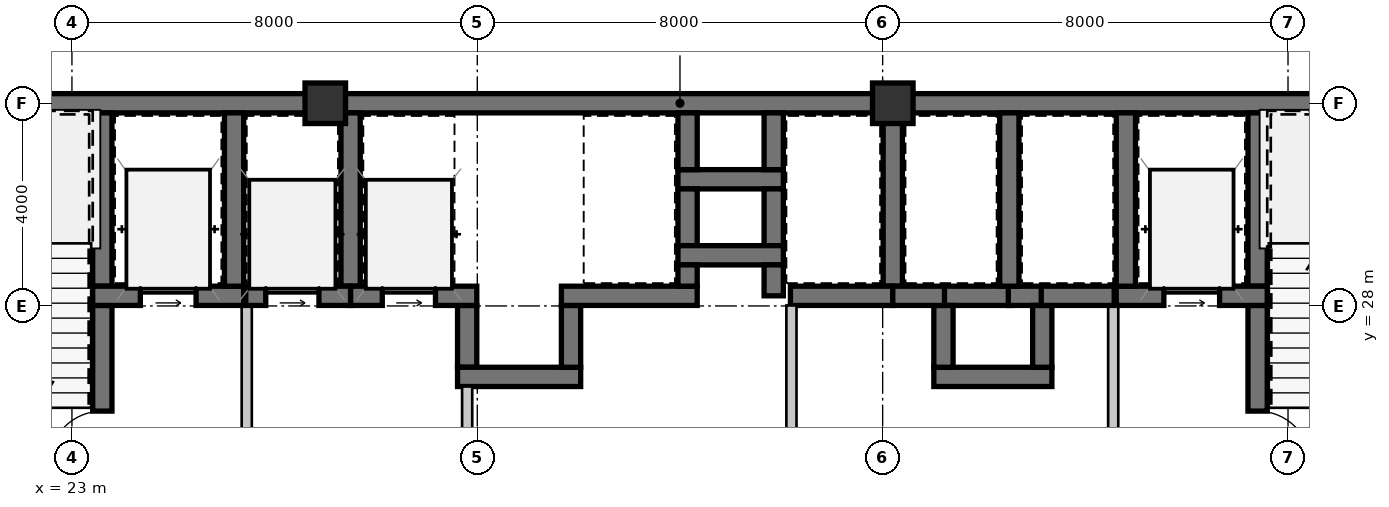
"""IFC4 building model, lengths in metres.
Left out: names, types, materials, properties, quantities, classifications, styles, units other than length and angle.
Written with IfcOpenShell. Run it as: python <this file> out.ifc"""

import sys

from ifc_helpers import new_model, si_unit, direction, frame, frame_2d, origin, origin_2d, place, context, subcontext, project, spatial, rectangle, extrude, source, transform, mapped, element, fill, save


model = new_model("IFC4")
c1 = context("Model", 3, precision=1e-05, world=origin(), true_north=direction((0.0, 1.0)))
c2 = subcontext(c1, "Body", "Model", "MODEL_VIEW")
j1 = project(units=[si_unit("LENGTHUNIT", "METRE"), si_unit("PLANEANGLEUNIT", "RADIAN")], contexts=[c1])
p1 = place(None, origin())
s1 = spatial("IfcSite", under=j1, at=p1, CompositionType="ELEMENT")
p2 = place(p1, origin())
s2 = spatial("IfcBuilding", under=s1, at=p2, CompositionType="ELEMENT")
p3 = place(p2, frame((0.0, 0.0, 51.45)))
s3 = spatial("IfcBuildingStorey", under=s2, at=p3, CompositionType="ELEMENT", Elevation=51.45)
m1 = source(origin(), c2, "Body", "SweptSolid", [
    extrude(rectangle(XDim=0.8, YDim=0.8, at=origin_2d()), origin(), (0.0, 0.0, 1.0), 3.15),
])
for number, where, z_axis, x_axis in (
    (1, (28.0, 32.0, 0.0), (0.0, 0.0, 1.0), (1.0, 0.0, 0.0)),
    (2, (39.2, 32.0, 0.0), (0.0, 0.0, 1.0), (1.0, 0.0, 0.0)),
):
    element("IfcColumn", number, at=place(p3, frame(where, z_axis=z_axis, x_axis=x_axis)), inside=s3, PredefinedType="COLUMN", context=c2, shape_type="MappedRepresentation", body=[
        mapped(m1, transform((0.0, 0.0, 0.0), scale=1.0)),
    ])
m2 = source(origin(), c2, "Body", "SweptSolid", [
    extrude(rectangle(XDim=9.19, YDim=0.38, at=frame_2d((4.595, 0.0))), origin(), (0.0, 0.0, 1.0), 2.93),
])
p4 = place(p3, frame((18.81, 32.0, 0.0), z_axis=(0.0, 0.0, 1.0), x_axis=(1.0, 0.0, 0.0)))
e3 = element("IfcWall", 3, at=p4, inside=s3, PredefinedType="SHEAR", context=c2, shape_type="MappedRepresentation", body=[
    mapped(m2, transform((0.0, 0.0, 0.0), scale=1.0)),
])
m3 = source(origin(), c2, "Body", "SweptSolid", [
    extrude(rectangle(XDim=11.2, YDim=0.38, at=frame_2d((5.6, 0.0))), origin(), (0.0, 0.0, 1.0), 2.93),
])
p5 = place(p3, frame((28.0, 32.0, 0.0), z_axis=(0.0, 0.0, 1.0), x_axis=(1.0, 0.0, 0.0)))
e4 = element("IfcWall", 4, at=p5, inside=s3, PredefinedType="SHEAR", context=c2, shape_type="MappedRepresentation", body=[
    mapped(m3, transform((0.0, 0.0, 0.0), scale=1.0)),
])
m4 = source(origin(), c2, "Body", "SweptSolid", [
    extrude(rectangle(XDim=11.99, YDim=0.38, at=frame_2d((5.995, 0.0))), origin(), (0.0, 0.0, 1.0), 2.93),
])
p6 = place(p3, frame((39.2, 32.0, 0.0), z_axis=(0.0, 0.0, 1.0), x_axis=(1.0, 0.0, 0.0)))
e5 = element("IfcWall", 5, at=p6, inside=s3, PredefinedType="SHEAR", context=c2, shape_type="MappedRepresentation", body=[
    mapped(m4, transform((0.0, 0.0, 0.0), scale=1.0)),
])
m5 = source(origin(), c2, "Body", "SweptSolid", [
    extrude(rectangle(XDim=3.42, YDim=0.38, at=frame_2d((1.71, 0.0))), origin(), (0.0, 0.0, 1.0), 2.93),
])
p7 = place(p3, frame((23.6, 28.39, 0.0), z_axis=(0.0, 0.0, 1.0), x_axis=(0.0, 1.0, 0.0)))
e6 = element("IfcWall", 6, at=p7, inside=s3, PredefinedType="SHEAR", context=c2, shape_type="MappedRepresentation", body=[
    mapped(m5, transform((0.0, 0.0, 0.0), scale=1.0)),
])
m6 = source(origin(), c2, "Body", "SweptSolid", [
    extrude(rectangle(XDim=3.82, YDim=0.38, at=frame_2d((1.91, 0.0))), origin(), (0.0, 0.0, 1.0), 2.93),
])
p8 = place(p3, frame((23.6, 24.19, 0.0), z_axis=(0.0, 0.0, 1.0), x_axis=(0.0, 1.0, 0.0)))
e7 = element("IfcWall", 7, at=p8, inside=s3, PredefinedType="SHEAR", context=c2, shape_type="MappedRepresentation", body=[
    mapped(m6, transform((0.0, 0.0, 0.0), scale=1.0)),
])
m7 = source(origin(), c2, "Body", "SweptSolid", [
    extrude(rectangle(XDim=1.05, YDim=2.1, at=frame_2d((0.525, 1.05))), frame((0.0, 0.2, 0.0), z_axis=(0.0, -1.0, 0.0), x_axis=(1.0, 0.0, 0.0)), (0.0, 0.0, 1.0), 0.4),
])
p9 = place(p8, frame((0.685, 0.0, 0.0)))
e8 = element("IfcOpeningElement", 8, at=p9, cuts=e7, PredefinedType="OPENING", context=c2, shape_type="MappedRepresentation", body=[
    mapped(m7, transform((0.0, 0.0, 0.0), scale=1.0)),
])
m8 = source(origin(), c2, "Body", "SweptSolid", [
    extrude(rectangle(XDim=2.98, YDim=0.38, at=frame_2d((1.49, 0.0))), origin(), (0.0, 0.0, 1.0), 2.93),
])
p10 = place(p3, frame((23.41, 28.2, 0.0), z_axis=(0.0, 0.0, 1.0), x_axis=(1.0, 0.0, 0.0)))
e9 = element("IfcWall", 9, at=p10, inside=s3, PredefinedType="SHEAR", context=c2, shape_type="MappedRepresentation", body=[
    mapped(m8, transform((0.0, 0.0, 0.0), scale=1.0)),
])
m9 = source(origin(), c2, "Body", "SweptSolid", [
    extrude(rectangle(XDim=1.1, YDim=2.15, at=frame_2d((0.55, 1.075))), frame((0.0, 0.2, 0.0), z_axis=(0.0, -1.0, 0.0), x_axis=(1.0, 0.0, 0.0)), (0.0, 0.0, 1.0), 0.4),
])
p11 = place(p10, frame((0.94, 0.0, 0.0)))
e10 = element("IfcOpeningElement", 10, at=p11, cuts=e9, PredefinedType="OPENING", context=c2, shape_type="MappedRepresentation", body=[
    mapped(m9, transform((0.0, 0.0, 0.0), scale=1.0)),
])
p12 = place(p3, frame((26.2, 28.39, 0.0), z_axis=(0.0, 0.0, 1.0), x_axis=(0.0, 1.0, 0.0)))
e11 = element("IfcWall", 11, at=p12, inside=s3, PredefinedType="SHEAR", context=c2, shape_type="MappedRepresentation", body=[
    mapped(m5, transform((0.0, 0.0, 0.0), scale=1.0)),
])
m10 = source(origin(), c2, "Body", "SweptSolid", [
    extrude(rectangle(XDim=3.91, YDim=0.2, at=frame_2d((1.955, 0.0))), origin(), (0.0, 0.0, 1.0), 2.93),
])
p13 = place(p3, frame((26.45, 24.1, 0.0), z_axis=(0.0, 0.0, 1.0), x_axis=(0.0, 1.0, 0.0)))
e12 = element("IfcWall", 12, at=p13, inside=s3, PredefinedType="SOLIDWALL", context=c2, shape_type="MappedRepresentation", body=[
    mapped(m10, transform((0.0, 0.0, 0.0), scale=1.0)),
])
p14 = place(p3, frame((46.4, 31.81, 0.0), z_axis=(0.0, 0.0, 1.0), x_axis=(0.0, -1.0, 0.0)))
e13 = element("IfcWall", 13, at=p14, inside=s3, PredefinedType="SHEAR", context=c2, shape_type="MappedRepresentation", body=[
    mapped(m5, transform((0.0, 0.0, 0.0), scale=1.0)),
])
p15 = place(p3, frame((46.4, 28.01, 0.0), z_axis=(0.0, 0.0, 1.0), x_axis=(0.0, -1.0, 0.0)))
e14 = element("IfcWall", 14, at=p15, inside=s3, PredefinedType="SHEAR", context=c2, shape_type="MappedRepresentation", body=[
    mapped(m6, transform((0.0, 0.0, 0.0), scale=1.0)),
])
p16 = place(p15, frame((2.085, 0.0, 0.0)))
e15 = element("IfcOpeningElement", 15, at=p16, cuts=e14, PredefinedType="OPENING", context=c2, shape_type="MappedRepresentation", body=[
    mapped(m7, transform((0.0, 0.0, 0.0), scale=1.0)),
])
p17 = place(p3, frame((43.61, 28.2, 0.0), z_axis=(0.0, 0.0, 1.0), x_axis=(1.0, 0.0, 0.0)))
e16 = element("IfcWall", 16, at=p17, inside=s3, PredefinedType="SHEAR", context=c2, shape_type="MappedRepresentation", body=[
    mapped(m8, transform((0.0, 0.0, 0.0), scale=1.0)),
])
p18 = place(p17, frame((0.94, 0.0, 0.0)))
e17 = element("IfcOpeningElement", 17, at=p18, cuts=e16, PredefinedType="OPENING", context=c2, shape_type="MappedRepresentation", body=[
    mapped(m9, transform((0.0, 0.0, 0.0), scale=1.0)),
])
p19 = place(p3, frame((43.8, 31.81, 0.0), z_axis=(0.0, 0.0, 1.0), x_axis=(0.0, -1.0, 0.0)))
e18 = element("IfcWall", 18, at=p19, inside=s3, PredefinedType="SHEAR", context=c2, shape_type="MappedRepresentation", body=[
    mapped(m5, transform((0.0, 0.0, 0.0), scale=1.0)),
])
p20 = place(p3, frame((43.55, 28.01, 0.0), z_axis=(0.0, 0.0, 1.0), x_axis=(0.0, -1.0, 0.0)))
e19 = element("IfcWall", 19, at=p20, inside=s3, PredefinedType="SOLIDWALL", context=c2, shape_type="MappedRepresentation", body=[
    mapped(m10, transform((0.0, 0.0, 0.0), scale=1.0)),
])
m11 = source(origin(), c2, "Body", "SweptSolid", [
    extrude(rectangle(XDim=2.08, YDim=0.38, at=frame_2d((1.04, 0.0))), origin(), (0.0, 0.0, 1.0), 2.93),
])
p21 = place(p3, frame((34.96, 30.5, 0.0), z_axis=(0.0, 0.0, 1.0), x_axis=(1.0, 0.0, 0.0)))
e20 = element("IfcWall", 20, at=p21, inside=s3, PredefinedType="SHEAR", context=c2, shape_type="MappedRepresentation", body=[
    mapped(m11, transform((0.0, 0.0, 0.0), scale=1.0)),
])
m12 = source(origin(), c2, "Body", "SweptSolid", [
    extrude(rectangle(XDim=1.12, YDim=0.38, at=frame_2d((0.56, 0.0))), origin(), (0.0, 0.0, 1.0), 2.93),
])
for number, where, z_axis, x_axis in (
    (21, (35.15, 31.81, 0.0), (0.0, 0.0, 1.0), (0.0, -1.0, 0.0)),
    (22, (36.85, 30.69, 0.0), (0.0, 0.0, 1.0), (0.0, 1.0, 0.0)),
    (23, (35.15, 30.31, 0.0), (0.0, 0.0, 1.0), (0.0, -1.0, 0.0)),
    (24, (36.85, 29.19, 0.0), (0.0, 0.0, 1.0), (0.0, 1.0, 0.0)),
):
    element("IfcWall", number, at=place(p3, frame(where, z_axis=z_axis, x_axis=x_axis)), inside=s3, PredefinedType="SHEAR", context=c2, shape_type="MappedRepresentation", body=[
        mapped(m12, transform((0.0, 0.0, 0.0), scale=1.0)),
    ])
p22 = place(p3, frame((34.96, 29.0, 0.0), z_axis=(0.0, 0.0, 1.0), x_axis=(1.0, 0.0, 0.0)))
e25 = element("IfcWall", 25, at=p22, inside=s3, PredefinedType="SHEAR", context=c2, shape_type="MappedRepresentation", body=[
    mapped(m11, transform((0.0, 0.0, 0.0), scale=1.0)),
])
m13 = source(origin(), c2, "Body", "SweptSolid", [
    extrude(rectangle(XDim=1.22, YDim=0.38, at=frame_2d((0.61, 0.0))), origin(), (0.0, 0.0, 1.0), 2.93),
])
p23 = place(p3, frame((30.8, 28.01, 0.0), z_axis=(0.0, 0.0, 1.0), x_axis=(0.0, -1.0, 0.0)))
e26 = element("IfcWall", 26, at=p23, inside=s3, PredefinedType="SHEAR", context=c2, shape_type="MappedRepresentation", body=[
    mapped(m13, transform((0.0, 0.0, 0.0), scale=1.0)),
])
m14 = source(origin(), c2, "Body", "SweptSolid", [
    extrude(rectangle(XDim=2.43, YDim=0.38, at=frame_2d((1.215, 0.0))), origin(), (0.0, 0.0, 1.0), 2.93),
])
p24 = place(p3, frame((30.61, 26.6, 0.0), z_axis=(0.0, 0.0, 1.0), x_axis=(1.0, 0.0, 0.0)))
e27 = element("IfcWall", 27, at=p24, inside=s3, PredefinedType="SHEAR", context=c2, shape_type="MappedRepresentation", body=[
    mapped(m14, transform((0.0, 0.0, 0.0), scale=1.0)),
])
p25 = place(p3, frame((32.85, 26.79, 0.0), z_axis=(0.0, 0.0, 1.0), x_axis=(0.0, 1.0, 0.0)))
e28 = element("IfcWall", 28, at=p25, inside=s3, PredefinedType="SHEAR", context=c2, shape_type="MappedRepresentation", body=[
    mapped(m13, transform((0.0, 0.0, 0.0), scale=1.0)),
])
m15 = source(origin(), c2, "Body", "SweptSolid", [
    extrude(rectangle(XDim=1.32, YDim=0.38, at=frame_2d((0.66, 0.0))), origin(), (0.0, 0.0, 1.0), 2.93),
])
p26 = place(p3, frame((41.52, 28.2, 0.0), z_axis=(0.0, 0.0, 1.0), x_axis=(-1.0, 0.0, 0.0)))
e29 = element("IfcWall", 29, at=p26, inside=s3, PredefinedType="SHEAR", context=c2, shape_type="MappedRepresentation", body=[
    mapped(m15, transform((0.0, 0.0, 0.0), scale=1.0)),
])
m16 = source(origin(), c2, "Body", "SweptSolid", [
    extrude(rectangle(XDim=0.67, YDim=0.38, at=frame_2d((0.335, 0.0))), origin(), (0.0, 0.0, 1.0), 2.93),
])
p27 = place(p3, frame((42.15, 28.2, 0.0), z_axis=(0.0, 0.0, 1.0), x_axis=(-1.0, 0.0, 0.0)))
e30 = element("IfcWall", 30, at=p27, inside=s3, PredefinedType="SHEAR", context=c2, shape_type="MappedRepresentation", body=[
    mapped(m16, transform((0.0, 0.0, 0.0), scale=1.0)),
])
m17 = source(origin(), c2, "Body", "SweptSolid", [
    extrude(rectangle(XDim=2.33, YDim=0.38, at=frame_2d((1.165, 0.0))), origin(), (0.0, 0.0, 1.0), 2.93),
])
p28 = place(p3, frame((40.01, 26.6, 0.0), z_axis=(0.0, 0.0, 1.0), x_axis=(1.0, 0.0, 0.0)))
e31 = element("IfcWall", 31, at=p28, inside=s3, PredefinedType="SHEAR", context=c2, shape_type="MappedRepresentation", body=[
    mapped(m17, transform((0.0, 0.0, 0.0), scale=1.0)),
])
for number, where, z_axis, x_axis in (
    (32, (40.2, 28.01, 0.0), (0.0, 0.0, 1.0), (0.0, -1.0, 0.0)),
    (33, (42.15, 26.79, 0.0), (0.0, 0.0, 1.0), (0.0, 1.0, 0.0)),
):
    element("IfcWall", number, at=place(p3, frame(where, z_axis=z_axis, x_axis=x_axis)), inside=s3, PredefinedType="SHEAR", context=c2, shape_type="MappedRepresentation", body=[
        mapped(m13, transform((0.0, 0.0, 0.0), scale=1.0)),
    ])
p29 = place(p3, frame((28.5, 28.39, 0.0), z_axis=(0.0, 0.0, 1.0), x_axis=(0.0, 1.0, 0.0)))
e34 = element("IfcWall", 34, at=p29, inside=s3, PredefinedType="SHEAR", context=c2, shape_type="MappedRepresentation", body=[
    mapped(m5, transform((0.0, 0.0, 0.0), scale=1.0)),
])
m18 = source(origin(), c2, "Body", "SweptSolid", [
    extrude(rectangle(XDim=2.07, YDim=0.38, at=frame_2d((1.035, 0.0))), origin(), (0.0, 0.0, 1.0), 2.93),
])
p30 = place(p3, frame((26.43, 28.2, 0.0), z_axis=(0.0, 0.0, 1.0), x_axis=(1.0, 0.0, 0.0)))
e35 = element("IfcWall", 35, at=p30, inside=s3, PredefinedType="SHEAR", context=c2, shape_type="MappedRepresentation", body=[
    mapped(m18, transform((0.0, 0.0, 0.0), scale=1.0)),
])
m19 = source(origin(), c2, "Body", "SweptSolid", [
    extrude(rectangle(XDim=1.05, YDim=2.15, at=frame_2d((0.525, 1.075))), frame((0.0, 0.2, 0.0), z_axis=(0.0, -1.0, 0.0), x_axis=(1.0, 0.0, 0.0)), (0.0, 0.0, 1.0), 0.4),
])
p31 = place(p30, frame((0.395, 0.0, 0.0)))
e36 = element("IfcOpeningElement", 36, at=p31, cuts=e35, PredefinedType="OPENING", context=c2, shape_type="MappedRepresentation", body=[
    mapped(m19, transform((0.0, 0.0, 0.0), scale=1.0)),
])
m20 = source(origin(), c2, "Body", "SweptSolid", [
    extrude(rectangle(XDim=2.49, YDim=0.38, at=frame_2d((1.245, 0.0))), origin(), (0.0, 0.0, 1.0), 2.93),
])
p32 = place(p3, frame((28.5, 28.2, 0.0), z_axis=(0.0, 0.0, 1.0), x_axis=(1.0, 0.0, 0.0)))
e37 = element("IfcWall", 37, at=p32, inside=s3, PredefinedType="SHEAR", context=c2, shape_type="MappedRepresentation", body=[
    mapped(m20, transform((0.0, 0.0, 0.0), scale=1.0)),
])
p33 = place(p32, frame((0.625, 0.0, 0.0)))
e38 = element("IfcOpeningElement", 38, at=p33, cuts=e37, PredefinedType="OPENING", context=c2, shape_type="MappedRepresentation", body=[
    mapped(m19, transform((0.0, 0.0, 0.0), scale=1.0)),
])
m21 = source(origin(), c2, "Body", "SweptSolid", [
    extrude(rectangle(XDim=2.31, YDim=0.2, at=frame_2d((1.155, 0.0))), origin(), (0.0, 0.0, 1.0), 2.93),
])
p34 = place(p3, frame((30.8, 26.41, 0.0), z_axis=(0.0, 0.0, 1.0), x_axis=(0.0, -1.0, 0.0)))
e39 = element("IfcWall", 39, at=p34, inside=s3, PredefinedType="SOLIDWALL", context=c2, shape_type="MappedRepresentation", body=[
    mapped(m21, transform((0.0, 0.0, 0.0), scale=1.0)),
])
m22 = source(origin(), c2, "Body", "SweptSolid", [
    extrude(rectangle(XDim=2.68, YDim=0.38, at=frame_2d((1.34, 0.0))), origin(), (0.0, 0.0, 1.0), 2.93),
])
p35 = place(p3, frame((32.66, 28.2, 0.0), z_axis=(0.0, 0.0, 1.0), x_axis=(1.0, 0.0, 0.0)))
e40 = element("IfcWall", 40, at=p35, inside=s3, PredefinedType="SHEAR", context=c2, shape_type="MappedRepresentation", body=[
    mapped(m22, transform((0.0, 0.0, 0.0), scale=1.0)),
])
m23 = source(origin(), c2, "Body", "SweptSolid", [
    extrude(rectangle(XDim=0.42, YDim=0.38, at=frame_2d((0.21, 0.0))), origin(), (0.0, 0.0, 1.0), 2.93),
])
p36 = place(p3, frame((35.15, 28.39, 0.0), z_axis=(0.0, 0.0, 1.0), x_axis=(0.0, 1.0, 0.0)))
e41 = element("IfcWall", 41, at=p36, inside=s3, PredefinedType="SHEAR", context=c2, shape_type="MappedRepresentation", body=[
    mapped(m23, transform((0.0, 0.0, 0.0), scale=1.0)),
])
p37 = place(p3, frame((39.2, 28.39, 0.0), z_axis=(0.0, 0.0, 1.0), x_axis=(0.0, 1.0, 0.0)))
e42 = element("IfcWall", 42, at=p37, inside=s3, PredefinedType="SHEAR", context=c2, shape_type="MappedRepresentation", body=[
    mapped(m5, transform((0.0, 0.0, 0.0), scale=1.0)),
])
m24 = source(origin(), c2, "Body", "SweptSolid", [
    extrude(rectangle(XDim=0.61, YDim=0.38, at=frame_2d((0.305, 0.0))), origin(), (0.0, 0.0, 1.0), 2.93),
])
p38 = place(p3, frame((36.85, 28.81, 0.0), z_axis=(0.0, 0.0, 1.0), x_axis=(0.0, -1.0, 0.0)))
e43 = element("IfcWall", 43, at=p38, inside=s3, PredefinedType="SHEAR", context=c2, shape_type="MappedRepresentation", body=[
    mapped(m24, transform((0.0, 0.0, 0.0), scale=1.0)),
])
m25 = source(origin(), c2, "Body", "SweptSolid", [
    extrude(rectangle(XDim=2.02, YDim=0.38, at=frame_2d((1.01, 0.0))), origin(), (0.0, 0.0, 1.0), 2.93),
])
p39 = place(p3, frame((37.18, 28.2, 0.0), z_axis=(0.0, 0.0, 1.0), x_axis=(1.0, 0.0, 0.0)))
e44 = element("IfcWall", 44, at=p39, inside=s3, PredefinedType="SHEAR", context=c2, shape_type="MappedRepresentation", body=[
    mapped(m25, transform((0.0, 0.0, 0.0), scale=1.0)),
])
p40 = place(p3, frame((41.5, 28.39, 0.0), z_axis=(0.0, 0.0, 1.0), x_axis=(0.0, 1.0, 0.0)))
e45 = element("IfcWall", 45, at=p40, inside=s3, PredefinedType="SHEAR", context=c2, shape_type="MappedRepresentation", body=[
    mapped(m5, transform((0.0, 0.0, 0.0), scale=1.0)),
])
m26 = source(origin(), c2, "Body", "SweptSolid", [
    extrude(rectangle(XDim=1.02, YDim=0.38, at=frame_2d((0.51, 0.0))), origin(), (0.0, 0.0, 1.0), 2.93),
])
p41 = place(p3, frame((39.2, 28.2, 0.0), z_axis=(0.0, 0.0, 1.0), x_axis=(1.0, 0.0, 0.0)))
e46 = element("IfcWall", 46, at=p41, inside=s3, PredefinedType="SHEAR", context=c2, shape_type="MappedRepresentation", body=[
    mapped(m26, transform((0.0, 0.0, 0.0), scale=1.0)),
])
m27 = source(origin(), c2, "Body", "SweptSolid", [
    extrude(rectangle(XDim=1.44, YDim=0.38, at=frame_2d((0.72, 0.0))), origin(), (0.0, 0.0, 1.0), 2.93),
])
p42 = place(p3, frame((42.13, 28.2, 0.0), z_axis=(0.0, 0.0, 1.0), x_axis=(1.0, 0.0, 0.0)))
e47 = element("IfcWall", 47, at=p42, inside=s3, PredefinedType="SHEAR", context=c2, shape_type="MappedRepresentation", body=[
    mapped(m27, transform((0.0, 0.0, 0.0), scale=1.0)),
])
p43 = place(p3, frame((37.2, 28.01, 0.0), z_axis=(0.0, 0.0, 1.0), x_axis=(0.0, -1.0, 0.0)))
e48 = element("IfcWall", 48, at=p43, inside=s3, PredefinedType="SOLIDWALL", context=c2, shape_type="MappedRepresentation", body=[
    mapped(m10, transform((0.0, 0.0, 0.0), scale=1.0)),
])
m28 = source(origin(), c2, "Body", "SweptSolid", [
    extrude(rectangle(XDim=1.05, YDim=2.1, at=frame_2d((0.525, 1.05))), frame((0.0, 0.025, 0.0), z_axis=(0.0, -1.0, 0.0), x_axis=(1.0, 0.0, 0.0)), (0.0, 0.0, 1.0), 0.05),
])
p44 = place(p9, origin())
e49 = element("IfcDoor", 49, at=p44, inside=s3, OperationType="SINGLE_SWING_LEFT", PredefinedType="DOOR", context=c2, shape_type="MappedRepresentation", body=[
    mapped(m28, transform((0.0, 0.0, 0.0), scale=1.0)),
])
fill(e8, e49)
m29 = source(origin(), c2, "Body", "SweptSolid", [
    extrude(rectangle(XDim=1.1, YDim=2.15, at=frame_2d((0.55, 1.075))), frame((0.0, 0.025, 0.0), z_axis=(0.0, -1.0, 0.0), x_axis=(1.0, 0.0, 0.0)), (0.0, 0.0, 1.0), 0.05),
])
p45 = place(p11, origin())
e50 = element("IfcDoor", 50, at=p45, inside=s3, OperationType="SLIDING_TO_LEFT", PredefinedType="DOOR", context=c2, shape_type="MappedRepresentation", body=[
    mapped(m29, transform((0.0, 0.0, 0.0), scale=1.0)),
])
fill(e10, e50)
p46 = place(p16, origin())
e51 = element("IfcDoor", 51, at=p46, inside=s3, OperationType="SINGLE_SWING_RIGHT", PredefinedType="DOOR", context=c2, shape_type="MappedRepresentation", body=[
    mapped(m28, transform((0.0, 0.0, 0.0), scale=1.0)),
])
fill(e15, e51)
p47 = place(p18, origin())
e52 = element("IfcDoor", 52, at=p47, inside=s3, OperationType="SLIDING_TO_LEFT", PredefinedType="DOOR", context=c2, shape_type="MappedRepresentation", body=[
    mapped(m29, transform((0.0, 0.0, 0.0), scale=1.0)),
])
fill(e17, e52)
m30 = source(origin(), c2, "Body", "SweptSolid", [
    extrude(rectangle(XDim=1.05, YDim=2.15, at=frame_2d((0.525, 1.075))), frame((0.0, 0.025, 0.0), z_axis=(0.0, -1.0, 0.0), x_axis=(1.0, 0.0, 0.0)), (0.0, 0.0, 1.0), 0.05),
])
p48 = place(p31, origin())
e53 = element("IfcDoor", 53, at=p48, inside=s3, OperationType="SLIDING_TO_LEFT", PredefinedType="DOOR", context=c2, shape_type="MappedRepresentation", body=[
    mapped(m30, transform((0.0, 0.0, 0.0), scale=1.0)),
])
fill(e36, e53)
p49 = place(p33, origin())
e54 = element("IfcDoor", 54, at=p49, inside=s3, OperationType="SLIDING_TO_LEFT", PredefinedType="DOOR", context=c2, shape_type="MappedRepresentation", body=[
    mapped(m30, transform((0.0, 0.0, 0.0), scale=1.0)),
])
fill(e38, e54)
save(model, sys.argv[1])
